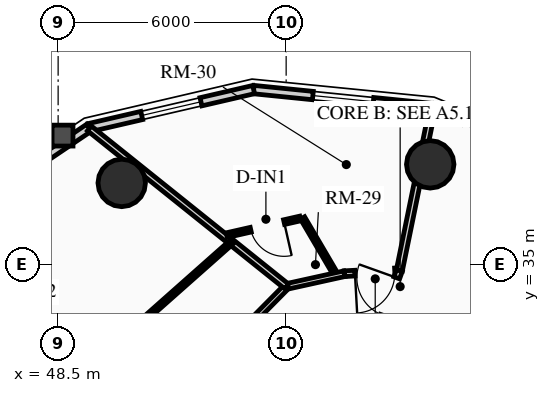
"""IFC4 building model, lengths in metres.
Left out: names, types, materials, properties, quantities, classifications, styles, units other than length and angle.
Written with IfcOpenShell. Run it as: python <this file> out.ifc"""

import sys

from ifc_helpers import new_model, si_unit, direction, frame, frame_2d, origin, origin_2d, place, context, subcontext, project, spatial, rectangle, circle, extrude, source, transform, mapped, element, fill, save


model = new_model("IFC4")
c1 = context("Model", 3, precision=1e-05, world=origin(), true_north=direction((0.0, 1.0)))
c2 = subcontext(c1, "Body", "Model", "MODEL_VIEW")
j1 = project(units=[si_unit("LENGTHUNIT", "METRE"), si_unit("PLANEANGLEUNIT", "RADIAN")], contexts=[c1])
p1 = place(None, origin())
s1 = spatial("IfcSite", under=j1, at=p1, CompositionType="ELEMENT")
p2 = place(p1, origin())
s2 = spatial("IfcBuilding", under=s1, at=p2, CompositionType="ELEMENT")
p3 = place(p2, frame((0.0, 0.0, 174.88)))
s3 = spatial("IfcBuildingStorey", under=s2, at=p3, CompositionType="ELEMENT", Elevation=174.88)
for number, where, z_axis, x_axis in (
    (1, (58.291, 37.635, 0.0), (0.0, 0.0, 1.0), (1.0, 0.0, 0.0)),
    (2, (50.173, 37.146, 0.0), (0.0, 0.0, 1.0), (1.0, 0.0, 0.0)),
):
    element("IfcColumn", number, at=place(p3, frame(where, z_axis=z_axis, x_axis=x_axis)), inside=s3, PredefinedType="USERDEFINED", context=c2, shape_type="SweptSolid", body=[
        extrude(circle(Radius=0.625, at=origin_2d()), origin(), (0.0, 0.0, 1.0), 2.91),
    ])
p4 = place(p3, frame((58.354, 39.127, 0.0), z_axis=(0.0, 0.0, 1.0), x_axis=(0.924556017656, -0.381046152345, 0.0)))
e3 = element("IfcWall", 3, at=p4, inside=s3, PredefinedType="SOLIDWALL", context=c2, shape_type="SweptSolid", body=[
    extrude(rectangle(XDim=0.87, YDim=0.22, at=frame_2d((0.435, 0.0))), origin(), (0.0, 0.0, 1.0), 2.245),
])
p5 = place(p3, frame((53.645, 39.603, 0.0), z_axis=(0.0, 0.0, 1.0), x_axis=(0.994943283129, -0.100438356004, 0.0)))
e4 = element("IfcWall", 4, at=p5, inside=s3, PredefinedType="SOLIDWALL", context=c2, shape_type="SweptSolid", body=[
    extrude(rectangle(XDim=4.733, YDim=0.22, at=frame_2d((2.366, 0.0))), origin(), (0.0, 0.0, 1.0), 2.245),
])
m1 = source(origin(), c2, "Body", "SweptSolid", [
    extrude(rectangle(XDim=1.6, YDim=1.3, at=frame_2d((0.8, 0.65))), frame((0.0, 0.12, 0.0), z_axis=(0.0, -1.0, 0.0), x_axis=(1.0, 0.0, 0.0)), (0.0, 0.0, 1.0), 0.24),
])
p6 = place(p5, frame((1.566, 0.0, 0.65)))
e5 = element("IfcOpeningElement", 5, at=p6, cuts=e4, PredefinedType="OPENING", context=c2, shape_type="MappedRepresentation", body=[
    mapped(m1, transform((0.0, 0.0, 0.0), x_axis=(1.0, 0.0, 0.0), y_axis=(0.0, 1.0, 0.0), z_axis=(0.0, 0.0, 1.0), scale=1.0)),
])
p7 = place(p3, frame((49.313, 38.6, 0.0), z_axis=(0.0, 0.0, 1.0), x_axis=(0.97422620202, 0.22557328587, 0.0)))
e6 = element("IfcWall", 6, at=p7, inside=s3, PredefinedType="SOLIDWALL", context=c2, shape_type="SweptSolid", body=[
    extrude(rectangle(XDim=4.446, YDim=0.22, at=frame_2d((2.223, 0.0))), origin(), (0.0, 0.0, 1.0), 2.245),
])
p8 = place(p7, frame((1.423, 0.0, 0.65)))
e7 = element("IfcOpeningElement", 7, at=p8, cuts=e6, PredefinedType="OPENING", context=c2, shape_type="MappedRepresentation", body=[
    mapped(m1, transform((0.0, 0.0, 0.0), x_axis=(1.0, 0.0, 0.0), y_axis=(0.0, 1.0, 0.0), z_axis=(0.0, 0.0, 1.0), scale=1.0)),
])
p9 = place(p3, frame((45.783, 36.217, 0.0), z_axis=(0.0, 0.0, 1.0), x_axis=(0.828817439852, 0.55951912514, 0.0)))
e8 = element("IfcWall", 8, at=p9, inside=s3, PredefinedType="SOLIDWALL", context=c2, shape_type="SweptSolid", body=[
    extrude(rectangle(XDim=4.259, YDim=0.22, at=frame_2d((2.129, 0.0))), origin(), (0.0, 0.0, 1.0), 2.245),
])
p10 = place(p3, frame((57.478, 34.838, 0.0), z_axis=(0.0, 0.0, 1.0), x_axis=(-0.998448388303, -0.05568497011, 0.0)))
e9 = element("IfcWall", 9, at=p10, inside=s3, PredefinedType="PARTITIONING", context=c2, shape_type="SweptSolid", body=[
    extrude(rectangle(XDim=1.447, YDim=0.15, at=frame_2d((0.723, 0.0))), origin(), (0.0, 0.0, 1.0), 2.245),
])
m2 = source(origin(), c2, "Body", "SweptSolid", [
    extrude(rectangle(XDim=1.05, YDim=2.015, at=frame_2d((0.525, 1.007))), frame((0.0, 0.085, 0.0), z_axis=(0.0, -1.0, 0.0), x_axis=(1.0, 0.0, 0.0)), (0.0, 0.0, 1.0), 0.17),
])
p11 = place(p10, frame((0.12, 0.0, 0.0)))
e10 = element("IfcOpeningElement", 10, at=p11, cuts=e9, PredefinedType="OPENING", context=c2, shape_type="MappedRepresentation", body=[
    mapped(m2, transform((0.0, 0.0, 0.0), x_axis=(1.0, 0.0, 0.0), y_axis=(0.0, 1.0, 0.0), z_axis=(0.0, 0.0, 1.0), scale=1.0)),
])
p12 = place(p3, frame((56.033, 34.757, 0.0), z_axis=(0.0, 0.0, 1.0), x_axis=(-0.976507263775, -0.215484486204, 0.0)))
e11 = element("IfcWall", 11, at=p12, inside=s3, PredefinedType="PARTITIONING", context=c2, shape_type="SweptSolid", body=[
    extrude(rectangle(XDim=1.556, YDim=0.15, at=frame_2d((0.778, 0.0))), origin(), (0.0, 0.0, 1.0), 2.245),
])
p13 = place(p3, frame((54.514, 34.422, 0.0), z_axis=(0.0, 0.0, 1.0), x_axis=(-0.703289573518, -0.710903492593, 0.0)))
e12 = element("IfcWall", 12, at=p13, inside=s3, PredefinedType="PARTITIONING", context=c2, shape_type="SweptSolid", body=[
    extrude(rectangle(XDim=3.303, YDim=0.15, at=frame_2d((1.651, 0.0))), origin(), (0.0, 0.0, 1.0), 2.245),
])
p14 = place(p3, frame((57.478, 34.838, 0.0), z_axis=(0.0, 0.0, 1.0), x_axis=(0.200272806445, 0.979740171167, 0.0)))
e13 = element("IfcWall", 13, at=p14, inside=s3, PredefinedType="PARTITIONING", context=c2, shape_type="SweptSolid", body=[
    extrude(rectangle(XDim=4.358, YDim=0.16, at=frame_2d((2.179, 0.0))), origin(), (0.0, 0.0, 1.0), 2.245),
])
p15 = place(p3, frame((54.514, 34.422, 0.0), z_axis=(0.0, 0.0, 1.0), x_axis=(-0.780385234796, 0.625299036712, 0.0)))
e14 = element("IfcWall", 14, at=p15, inside=s3, PredefinedType="PARTITIONING", context=c2, shape_type="SweptSolid", body=[
    extrude(rectangle(XDim=6.653, YDim=0.16, at=frame_2d((3.326, 0.0))), origin(), (0.0, 0.0, 1.0), 2.245),
])
p16 = place(p3, frame((56.828, 33.021, 0.0), z_axis=(0.0, 0.0, 1.0), x_axis=(0.336608838259, 0.941644566705, 0.0)))
e15 = element("IfcWall", 15, at=p16, inside=s3, PredefinedType="PARTITIONING", context=c2, shape_type="SweptSolid", body=[
    extrude(rectangle(XDim=1.93, YDim=0.16, at=frame_2d((0.965, 0.0))), origin(), (0.0, 0.0, 1.0), 2.245),
])
m3 = source(origin(), c2, "Body", "SweptSolid", [
    extrude(rectangle(XDim=1.05, YDim=2.015, at=frame_2d((0.525, 1.007))), frame((0.0, 0.09, 0.0), z_axis=(0.0, -1.0, 0.0), x_axis=(1.0, 0.0, 0.0)), (0.0, 0.0, 1.0), 0.18),
])
p17 = place(p16, frame((0.68, 0.0, 0.0)))
e16 = element("IfcOpeningElement", 16, at=p17, cuts=e15, PredefinedType="OPENING", context=c2, shape_type="MappedRepresentation", body=[
    mapped(m3, transform((0.0, 0.0, 0.0), x_axis=(1.0, 0.0, 0.0), y_axis=(0.0, 1.0, 0.0), z_axis=(0.0, 0.0, 1.0), scale=1.0)),
])
p18 = place(p3, frame((55.737, 34.853, 0.0), z_axis=(0.0, 0.0, 1.0), x_axis=(-0.506282425857, 0.862367732043, 0.0)))
e17 = element("IfcWall", 17, at=p18, inside=s3, PredefinedType="PARTITIONING", context=c2, shape_type="SweptSolid", body=[
    extrude(rectangle(XDim=1.591, YDim=0.125, at=frame_2d((0.796, 0.0))), origin(), (0.0, 0.0, 1.0), 2.245),
])
p19 = place(p3, frame((54.871, 36.211, 0.0), z_axis=(0.0, 0.0, 1.0), x_axis=(-0.975212623293, -0.221269833846, 0.0)))
e18 = element("IfcWall", 18, at=p19, inside=s3, PredefinedType="PARTITIONING", context=c2, shape_type="SweptSolid", body=[
    extrude(rectangle(XDim=1.983, YDim=0.125, at=frame_2d((0.991, 0.0))), origin(), (0.0, 0.0, 1.0), 2.312),
])
m4 = source(origin(), c2, "Body", "SweptSolid", [
    extrude(rectangle(XDim=0.9, YDim=2.005, at=frame_2d((0.45, 1.002))), frame((0.0, 0.073, 0.0), z_axis=(0.0, -1.0, 0.0), x_axis=(1.0, 0.0, 0.0)), (0.0, 0.0, 1.0), 0.145),
])
p20 = place(p19, frame((0.436, 0.0, 0.0)))
e19 = element("IfcOpeningElement", 19, at=p20, cuts=e18, PredefinedType="OPENING", context=c2, shape_type="MappedRepresentation", body=[
    mapped(m4, transform((0.0, 0.0, 0.0), x_axis=(1.0, 0.0, 0.0), y_axis=(0.0, 1.0, 0.0), z_axis=(0.0, 0.0, 1.0), scale=1.0)),
])
p21 = place(p3, frame((53.06, 35.587, 0.0), z_axis=(0.0, 0.0, 1.0), x_axis=(-0.748390346028, -0.663258539314, 0.0)))
e20 = element("IfcWall", 20, at=p21, inside=s3, PredefinedType="PARTITIONING", context=c2, shape_type="SweptSolid", body=[
    extrude(rectangle(XDim=3.553, YDim=0.125, at=frame_2d((1.777, 0.0))), origin(), (0.0, 0.0, 1.0), 2.245),
])
m5 = source(origin(), c2, "Body", "SweptSolid", [
    extrude(rectangle(XDim=1.6, YDim=1.3, at=frame_2d((0.8, 0.65))), frame((0.0, 0.03, 0.0), z_axis=(0.0, -1.0, 0.0), x_axis=(1.0, 0.0, 0.0)), (0.0, 0.0, 1.0), 0.06),
])
p22 = place(p6, origin())
e21 = element("IfcWindow", 21, at=p22, inside=s3, PartitioningType="SINGLE_PANEL", PredefinedType="WINDOW", context=c2, shape_type="MappedRepresentation", body=[
    mapped(m5, transform((0.0, 0.0, 0.0), x_axis=(1.0, 0.0, 0.0), y_axis=(0.0, 1.0, 0.0), z_axis=(0.0, 0.0, 1.0), scale=1.0)),
])
fill(e5, e21)
p23 = place(p8, origin())
e22 = element("IfcWindow", 22, at=p23, inside=s3, PartitioningType="SINGLE_PANEL", PredefinedType="WINDOW", context=c2, shape_type="MappedRepresentation", body=[
    mapped(m5, transform((0.0, 0.0, 0.0), x_axis=(1.0, 0.0, 0.0), y_axis=(0.0, 1.0, 0.0), z_axis=(0.0, 0.0, 1.0), scale=1.0)),
])
fill(e7, e22)
m6 = source(origin(), c2, "Body", "SweptSolid", [
    extrude(rectangle(XDim=1.05, YDim=2.015, at=frame_2d((0.525, 1.007))), frame((0.0, 0.025, 0.0), z_axis=(0.0, -1.0, 0.0), x_axis=(1.0, 0.0, 0.0)), (0.0, 0.0, 1.0), 0.05),
])
p24 = place(p17, origin())
e23 = element("IfcDoor", 23, at=p24, inside=s3, OperationType="SINGLE_SWING_RIGHT", PredefinedType="DOOR", context=c2, shape_type="MappedRepresentation", body=[
    mapped(m6, transform((0.0, 0.0, 0.0), x_axis=(1.0, 0.0, 0.0), y_axis=(0.0, 1.0, 0.0), z_axis=(0.0, 0.0, 1.0), scale=1.0)),
])
fill(e16, e23)
p25 = place(p11, origin())
e24 = element("IfcDoor", 24, at=p25, inside=s3, OperationType="SINGLE_SWING_RIGHT", PredefinedType="DOOR", context=c2, shape_type="MappedRepresentation", body=[
    mapped(m6, transform((0.0, 0.0, 0.0), x_axis=(1.0, 0.0, 0.0), y_axis=(0.0, 1.0, 0.0), z_axis=(0.0, 0.0, 1.0), scale=1.0)),
])
fill(e10, e24)
m7 = source(origin(), c2, "Body", "SweptSolid", [
    extrude(rectangle(XDim=0.9, YDim=2.005, at=frame_2d((0.45, 1.002))), frame((0.0, 0.025, 0.0), z_axis=(0.0, -1.0, 0.0), x_axis=(1.0, 0.0, 0.0)), (0.0, 0.0, 1.0), 0.05),
])
p26 = place(p20, origin())
e25 = element("IfcDoor", 25, at=p26, inside=s3, OperationType="SINGLE_SWING_LEFT", PredefinedType="DOOR", context=c2, shape_type="MappedRepresentation", body=[
    mapped(m7, transform((0.0, 0.0, 0.0), x_axis=(1.0, 0.0, 0.0), y_axis=(0.0, 1.0, 0.0), z_axis=(0.0, 0.0, 1.0), scale=1.0)),
])
fill(e19, e25)
save(model, sys.argv[1])
